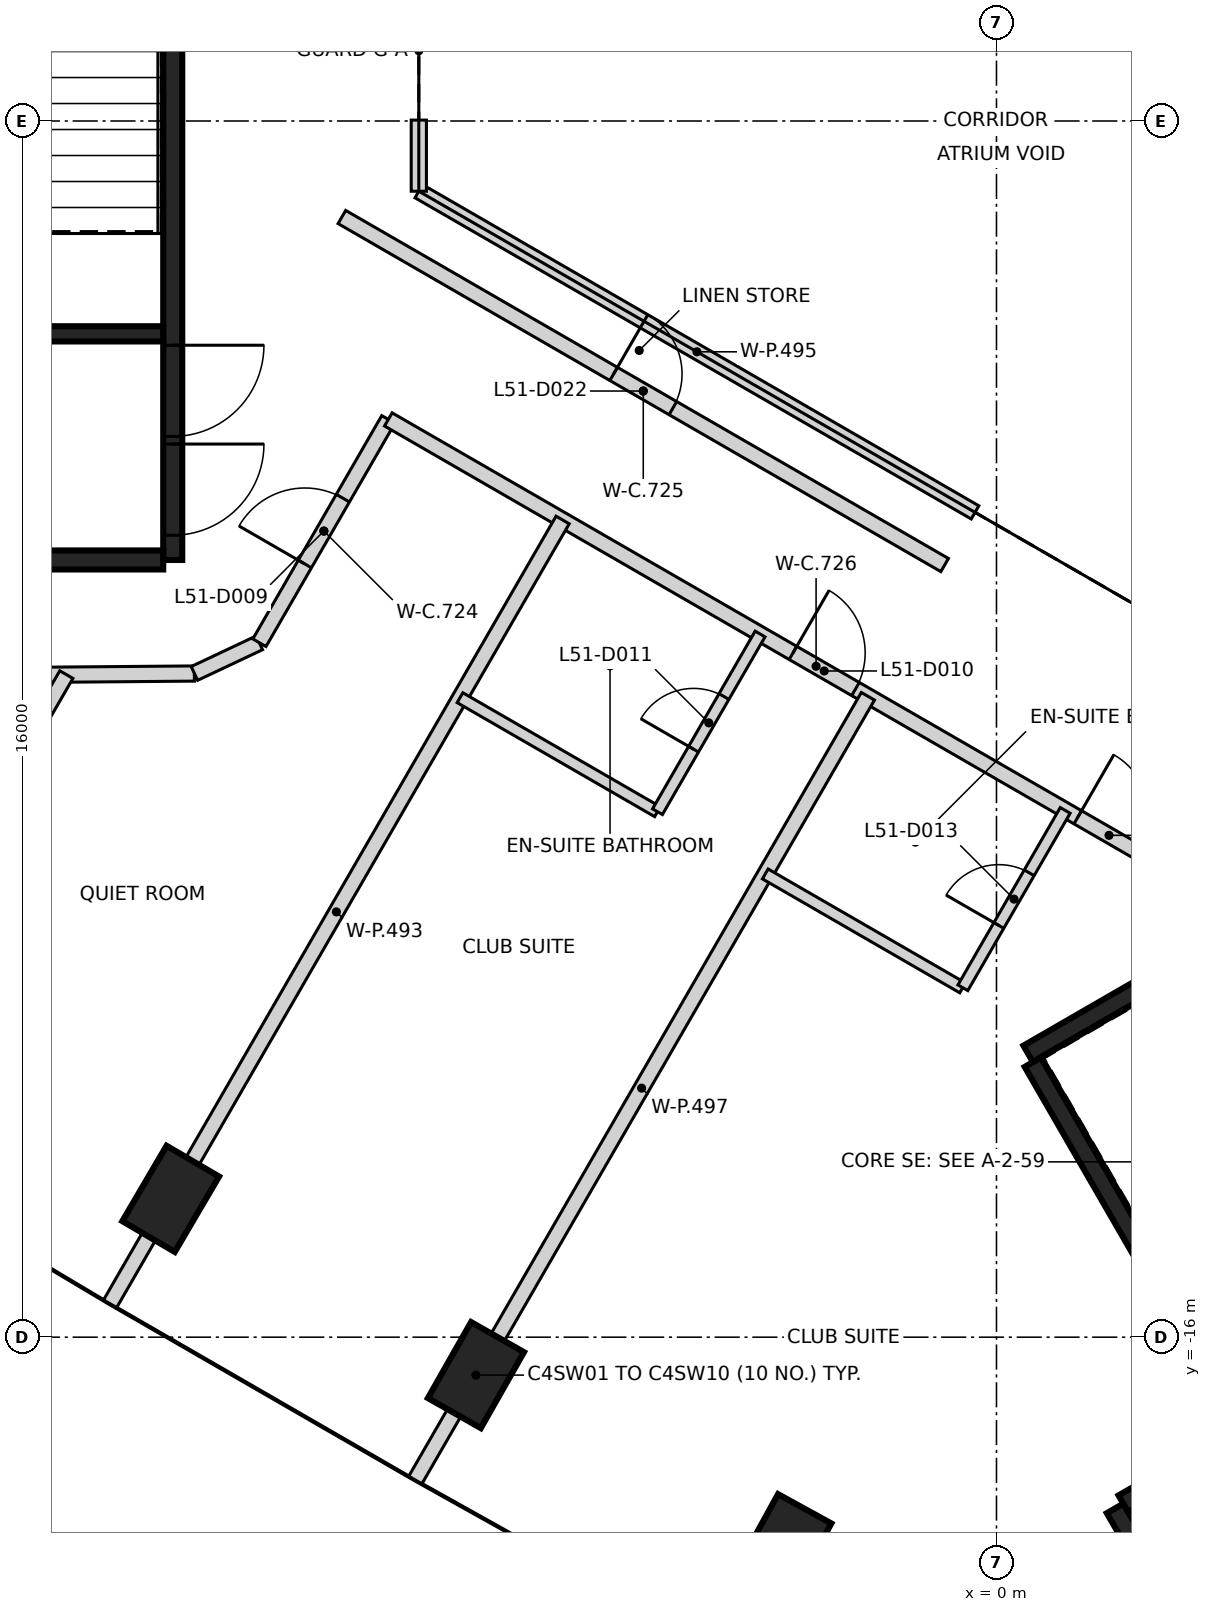
"""IFC4 building model, lengths in metres.
Left out: names, types, materials, properties, quantities, classifications, styles, units other than length and angle.
Written with IfcOpenShell. Run it as: python <this file> out.ifc"""

import sys

from ifc_helpers import new_model, si_unit, direction, frame, frame_2d, origin, origin_2d, place, context, subcontext, project, spatial, rectangle, extrude, element, fill, save


model = new_model("IFC4")
c1 = context("Model", 3, precision=1e-05, world=origin(), true_north=direction((0.0, 1.0)))
c2 = subcontext(c1, "Body", "Model", "MODEL_VIEW")
j1 = project(units=[si_unit("LENGTHUNIT", "METRE"), si_unit("PLANEANGLEUNIT", "RADIAN")], contexts=[c1])
p1 = place(None, origin())
s1 = spatial("IfcSite", under=j1, at=p1, CompositionType="ELEMENT")
p2 = place(p1, origin())
s2 = spatial("IfcBuilding", under=s1, at=p2, CompositionType="ELEMENT")
p3 = place(p2, frame((0.0, 0.0, 204.4)))
s3 = spatial("IfcBuildingStorey", under=s2, at=p3, CompositionType="ELEMENT", Elevation=204.4)
for number, where, z_axis, x_axis in (
    (1, (-10.864, -14.18, -0.35), (0.0, 0.0, 1.0), (0.506, 0.862, 0.0)),
    (2, (-6.848, -16.499, -0.35), (0.0, 0.0, 1.0), (0.494, 0.87, 0.0)),
    (3, (-2.8, -18.762, -0.35), (0.0, 0.0, 1.0), (0.482, 0.876, 0.0)),
):
    element("IfcColumn", number, at=place(p3, frame(where, z_axis=z_axis, x_axis=x_axis)), inside=s3, PredefinedType="COLUMN", context=c2, shape_type="SweptSolid", body=[
        extrude(rectangle(XDim=1.15, YDim=0.8, at=origin_2d()), origin(), (0.0, 0.0, 1.0), 3.6),
    ])
p4 = place(p3, frame((-10.837, 5.775, 0.0), z_axis=(0.0, 0.0, 1.0), x_axis=(0.0, -1.0, 0.0)))
e4 = element("IfcWall", 4, at=p4, inside=s3, PredefinedType="SHEAR", context=c2, shape_type="SweptSolid", body=[
    extrude(rectangle(XDim=11.55, YDim=0.25, at=frame_2d((5.775, 0.0))), origin(), (0.0, 0.0, 1.0), 3.25),
])
p5 = place(p4, frame((10.025, 0.0, 0.0)))
e5 = element("IfcOpeningElement", 5, at=p5, cuts=e4, PredefinedType="OPENING", context=c2, shape_type="SweptSolid", body=[
    extrude(rectangle(XDim=1.2, YDim=2.1, at=frame_2d((0.6, 1.05))), frame((0.0, 0.135, 0.0), z_axis=(0.0, -1.0, 0.0), x_axis=(1.0, 0.0, 0.0)), (0.0, 0.0, 1.0), 0.27),
])
p6 = place(p4, frame((8.725, 0.0, 0.0)))
e6 = element("IfcOpeningElement", 6, at=p6, cuts=e4, PredefinedType="OPENING", context=c2, shape_type="SweptSolid", body=[
    extrude(rectangle(XDim=1.2, YDim=2.1, at=frame_2d((0.6, 1.05))), frame((0.0, 0.135, 0.0), z_axis=(0.0, -1.0, 0.0), x_axis=(1.0, 0.0, 0.0)), (0.0, 0.0, 1.0), 0.27),
])
p7 = place(p3, frame((-10.963, -5.775, 0.0), z_axis=(0.0, 0.0, 1.0), x_axis=(-1.0, 0.0, 0.0)))
e7 = element("IfcWall", 7, at=p7, inside=s3, PredefinedType="SHEAR", context=c2, shape_type="SweptSolid", body=[
    extrude(rectangle(XDim=5.225, YDim=0.25, at=frame_2d((2.612, 0.0))), origin(), (0.0, 0.0, 1.0), 3.25),
])
p8 = place(p3, frame((-10.963, -2.8, 0.0), z_axis=(0.0, 0.0, 1.0), x_axis=(-1.0, 0.0, 0.0)))
e8 = element("IfcWall", 8, at=p8, inside=s3, PredefinedType="SHEAR", context=c2, shape_type="SweptSolid", body=[
    extrude(rectangle(XDim=5.098, YDim=0.2, at=frame_2d((2.549, 0.0))), origin(), (0.0, 0.0, 1.0), 3.25),
])
p9 = place(p8, frame((1.774, 0.0, 0.0)))
e9 = element("IfcOpeningElement", 9, at=p9, cuts=e8, PredefinedType="OPENING", context=c2, shape_type="SweptSolid", body=[
    extrude(rectangle(XDim=1.4, YDim=2.1, at=frame_2d((0.7, 1.05))), frame((0.0, 0.11, 0.0), z_axis=(0.0, -1.0, 0.0), x_axis=(1.0, 0.0, 0.0)), (0.0, 0.0, 1.0), 0.22),
])
p10 = place(p3, frame((0.417, -12.273, 0.0), z_axis=(0.0, 0.0, 1.0), x_axis=(0.866021906294, 0.500006057782, 0.0)))
e10 = element("IfcWall", 10, at=p10, inside=s3, PredefinedType="SHEAR", context=c2, shape_type="SweptSolid", body=[
    extrude(rectangle(XDim=11.55, YDim=0.25, at=frame_2d((5.775, 0.0))), origin(), (0.0, 0.0, 1.0), 3.25),
])
p11 = place(p10, frame((10.025, 0.0, 0.0)))
e11 = element("IfcOpeningElement", 11, at=p11, cuts=e10, PredefinedType="OPENING", context=c2, shape_type="SweptSolid", body=[
    extrude(rectangle(XDim=1.2, YDim=2.1, at=frame_2d((0.6, 1.05))), frame((0.0, 0.135, 0.0), z_axis=(0.0, -1.0, 0.0), x_axis=(1.0, 0.0, 0.0)), (0.0, 0.0, 1.0), 0.27),
])
p12 = place(p10, frame((8.725, 0.0, 0.0)))
e12 = element("IfcOpeningElement", 12, at=p12, cuts=e10, PredefinedType="OPENING", context=c2, shape_type="SweptSolid", body=[
    extrude(rectangle(XDim=1.2, YDim=2.1, at=frame_2d((0.6, 1.05))), frame((0.0, 0.135, 0.0), z_axis=(0.0, -1.0, 0.0), x_axis=(1.0, 0.0, 0.0)), (0.0, 0.0, 1.0), 0.27),
])
p13 = place(p3, frame((3.235, -17.153, 0.0), z_axis=(0.0, 0.0, 1.0), x_axis=(-0.500008851346, 0.866020293397, 0.0)))
e13 = element("IfcWall", 13, at=p13, inside=s3, PredefinedType="SHEAR", context=c2, shape_type="SweptSolid", body=[
    extrude(rectangle(XDim=5.51, YDim=0.25, at=frame_2d((2.755, 0.0))), origin(), (0.0, 0.0, 1.0), 3.25),
])
p14 = place(p3, frame((3.085, -20.894, 0.0), z_axis=(0.0, 0.0, 1.0), x_axis=(-0.499978833458, 0.866037623948, 0.0)))
e14 = element("IfcWall", 14, at=p14, inside=s3, PredefinedType="SHEAR", context=c2, shape_type="SweptSolid", body=[
    extrude(rectangle(XDim=3.05, YDim=0.25, at=frame_2d((1.525, 0.0))), origin(), (0.0, 0.0, 1.0), 3.25),
])
p15 = place(p3, frame((1.669, -18.19, 0.0), z_axis=(0.0, 0.0, 1.0), x_axis=(0.866042235819, 0.499970844928, 0.0)))
e15 = element("IfcWall", 15, at=p15, inside=s3, PredefinedType="SHEAR", context=c2, shape_type="SweptSolid", body=[
    extrude(rectangle(XDim=2.865, YDim=0.25, at=frame_2d((1.432, 0.0))), origin(), (0.0, 0.0, 1.0), 3.25),
])
p16 = place(p3, frame((-20.944, -7.356, 0.0), z_axis=(0.0, 0.0, 1.0), x_axis=(0.999965021341, 0.008363976025, 0.0)))
e16 = element("IfcWall", 16, at=p16, inside=s3, PredefinedType="PARTITIONING", context=c2, shape_type="SweptSolid", body=[
    extrude(rectangle(XDim=10.391, YDim=0.2, at=frame_2d((5.196, 0.0))), origin(), (0.0, 0.0, 1.0), 3.25),
])
p17 = place(p16, frame((3.86, 0.0, 0.0)))
e17 = element("IfcOpeningElement", 17, at=p17, cuts=e16, PredefinedType="OPENING", context=c2, shape_type="SweptSolid", body=[
    extrude(rectangle(XDim=1.0, YDim=2.1, at=frame_2d((0.5, 1.05))), frame((0.0, 0.11, 0.0), z_axis=(0.0, -1.0, 0.0), x_axis=(1.0, 0.0, 0.0)), (0.0, 0.0, 1.0), 0.22),
])
p18 = place(p3, frame((-10.552, -7.268, 0.0), z_axis=(0.0, 0.0, 1.0), x_axis=(0.904331815333, 0.426830139255, 0.0)))
e18 = element("IfcWall", 18, at=p18, inside=s3, PredefinedType="PARTITIONING", context=c2, shape_type="SweptSolid", body=[
    extrude(rectangle(XDim=0.944, YDim=0.2, at=frame_2d((0.472, 0.0))), origin(), (0.0, 0.0, 1.0), 3.25),
])
p19 = place(p3, frame((-9.697, -6.864, 0.0), z_axis=(0.0, 0.0, 1.0), x_axis=(0.499955030392, 0.866051365443, 0.0)))
e19 = element("IfcWall", 19, at=p19, inside=s3, PredefinedType="PARTITIONING", context=c2, shape_type="SweptSolid", body=[
    extrude(rectangle(XDim=3.392, YDim=0.2, at=frame_2d((1.696, 0.0))), origin(), (0.0, 0.0, 1.0), 3.25),
])
p20 = place(p19, frame((1.196, 0.0, 0.0)))
e20 = element("IfcOpeningElement", 20, at=p20, cuts=e19, PredefinedType="OPENING", context=c2, shape_type="SweptSolid", body=[
    extrude(rectangle(XDim=1.0, YDim=2.1, at=frame_2d((0.5, 1.05))), frame((0.0, 0.11, 0.0), z_axis=(0.0, -1.0, 0.0), x_axis=(1.0, 0.0, 0.0)), (0.0, 0.0, 1.0), 0.22),
])
p21 = place(p3, frame((-8.612, -1.263, 0.0), z_axis=(0.0, 0.0, 1.0), x_axis=(0.865996442381, -0.500050159267, 0.0)))
e21 = element("IfcWall", 21, at=p21, inside=s3, PredefinedType="PARTITIONING", context=c2, shape_type="SweptSolid", body=[
    extrude(rectangle(XDim=9.157, YDim=0.2, at=frame_2d((4.579, 0.0))), origin(), (0.0, 0.0, 1.0), 3.25),
])
p22 = place(p21, frame((4.128, 0.0, 0.0)))
e22 = element("IfcOpeningElement", 22, at=p22, cuts=e21, PredefinedType="OPENING", context=c2, shape_type="SweptSolid", body=[
    extrude(rectangle(XDim=0.9, YDim=2.1, at=frame_2d((0.45, 1.05))), frame((0.0, 0.11, 0.0), z_axis=(0.0, -1.0, 0.0), x_axis=(1.0, 0.0, 0.0)), (0.0, 0.0, 1.0), 0.22),
])
p23 = place(p3, frame((-8.001, -3.926, 0.0), z_axis=(0.0, 0.0, 1.0), x_axis=(0.866131158271, -0.499816783104, 0.0)))
e23 = element("IfcWall", 23, at=p23, inside=s3, PredefinedType="PARTITIONING", context=c2, shape_type="SweptSolid", body=[
    extrude(rectangle(XDim=12.995, YDim=0.2, at=frame_2d((6.498, 0.0))), origin(), (0.0, 0.0, 1.0), 3.25),
])
p24 = place(p23, frame((6.146, 0.0, 0.0)))
e24 = element("IfcOpeningElement", 24, at=p24, cuts=e23, PredefinedType="OPENING", context=c2, shape_type="SweptSolid", body=[
    extrude(rectangle(XDim=0.95, YDim=2.1, at=frame_2d((0.475, 1.05))), frame((0.0, 0.11, 0.0), z_axis=(0.0, -1.0, 0.0), x_axis=(1.0, 0.0, 0.0)), (0.0, 0.0, 1.0), 0.22),
])
p25 = place(p23, frame((10.472, 0.0, 0.0)))
e25 = element("IfcOpeningElement", 25, at=p25, cuts=e23, PredefinedType="OPENING", context=c2, shape_type="SweptSolid", body=[
    extrude(rectangle(XDim=0.95, YDim=2.1, at=frame_2d((0.475, 1.05))), frame((0.0, 0.11, 0.0), z_axis=(0.0, -1.0, 0.0), x_axis=(1.0, 0.0, 0.0)), (0.0, 0.0, 1.0), 0.22),
])
p26 = place(p3, frame((-15.645, -13.187, 0.0), z_axis=(0.0, 0.0, 1.0), x_axis=(0.499921913572, 0.866070482311, 0.0)))
e26 = element("IfcWall", 26, at=p26, inside=s3, PredefinedType="PARTITIONING", context=c2, shape_type="SweptSolid", body=[
    extrude(rectangle(XDim=6.816, YDim=0.2, at=frame_2d((3.408, 0.0))), origin(), (0.0, 0.0, 1.0), 3.25),
])
p27 = place(p3, frame((-11.661, -15.561, 0.0), z_axis=(0.0, 0.0, 1.0), x_axis=(0.500000523332, 0.866025101638, 0.0)))
e27 = element("IfcWall", 27, at=p27, inside=s3, PredefinedType="PARTITIONING", context=c2, shape_type="SweptSolid", body=[
    extrude(rectangle(XDim=11.907, YDim=0.2, at=frame_2d((5.953, 0.0))), origin(), (0.0, 0.0, 1.0), 3.25),
])
p28 = place(p3, frame((-7.6, -0.924, 0.0), z_axis=(0.0, 0.0, 1.0), x_axis=(0.866038843867, -0.499976720371, 0.0)))
e28 = element("IfcWall", 28, at=p28, inside=s3, PredefinedType="PARTITIONING", context=c2, shape_type="SweptSolid", body=[
    extrude(rectangle(XDim=8.45, YDim=0.2, at=frame_2d((4.225, 0.0))), origin(), (0.0, 0.0, 1.0), 3.25),
])
p29 = place(p3, frame((-7.6, -0.924, 0.0), z_axis=(0.0, 0.0, 1.0), x_axis=(0.0, 1.0, 0.0)))
e29 = element("IfcWall", 29, at=p29, inside=s3, PredefinedType="PARTITIONING", context=c2, shape_type="SweptSolid", body=[
    extrude(rectangle(XDim=0.936, YDim=0.2, at=frame_2d((0.468, 0.0))), origin(), (0.0, 0.0, 1.0), 3.25),
])
p30 = place(p3, frame((-7.646, -17.879, 0.0), z_axis=(0.0, 0.0, 1.0), x_axis=(0.500042538917, 0.866000842536, 0.0)))
e30 = element("IfcWall", 30, at=p30, inside=s3, PredefinedType="PARTITIONING", context=c2, shape_type="SweptSolid", body=[
    extrude(rectangle(XDim=11.906, YDim=0.2, at=frame_2d((5.953, 0.0))), origin(), (0.0, 0.0, 1.0), 3.25),
])
p31 = place(p3, frame((-7.058, -7.587, 0.0), z_axis=(0.0, 0.0, 1.0), x_axis=(0.866031096941, -0.499990139034, 0.0)))
e31 = element("IfcWall", 31, at=p31, inside=s3, PredefinedType="PARTITIONING", context=c2, shape_type="SweptSolid", body=[
    extrude(rectangle(XDim=3.0, YDim=0.15, at=frame_2d((1.5, 0.0))), origin(), (0.0, 0.0, 1.0), 3.25),
])
p32 = place(p3, frame((-4.46, -9.087, 0.0), z_axis=(0.0, 0.0, 1.0), x_axis=(0.50001992892, 0.866013897511, 0.0)))
e32 = element("IfcWall", 32, at=p32, inside=s3, PredefinedType="PARTITIONING", context=c2, shape_type="SweptSolid", body=[
    extrude(rectangle(XDim=2.7, YDim=0.15, at=frame_2d((1.35, 0.0))), origin(), (0.0, 0.0, 1.0), 3.25),
])
p33 = place(p32, frame((0.95, 0.0, 0.0)))
e33 = element("IfcOpeningElement", 33, at=p33, cuts=e32, PredefinedType="OPENING", context=c2, shape_type="SweptSolid", body=[
    extrude(rectangle(XDim=0.8, YDim=2.1, at=frame_2d((0.4, 1.05))), frame((0.0, 0.085, 0.0), z_axis=(0.0, -1.0, 0.0), x_axis=(1.0, 0.0, 0.0)), (0.0, 0.0, 1.0), 0.17),
])
p34 = place(p3, frame((-3.042, -9.906, 0.0), z_axis=(0.0, 0.0, 1.0), x_axis=(0.866009279501, -0.500027927039, 0.0)))
e34 = element("IfcWall", 34, at=p34, inside=s3, PredefinedType="PARTITIONING", context=c2, shape_type="SweptSolid", body=[
    extrude(rectangle(XDim=2.998, YDim=0.15, at=frame_2d((1.499, 0.0))), origin(), (0.0, 0.0, 1.0), 3.25),
])
p35 = place(p3, frame((-0.442, -11.403, 0.0), z_axis=(0.0, 0.0, 1.0), x_axis=(0.499717222117, 0.866188604127, 0.0)))
e35 = element("IfcWall", 35, at=p35, inside=s3, PredefinedType="PARTITIONING", context=c2, shape_type="SweptSolid", body=[
    extrude(rectangle(XDim=2.693, YDim=0.15, at=frame_2d((1.347, 0.0))), origin(), (0.0, 0.0, 1.0), 3.25),
])
p36 = place(p35, frame((0.946, 0.0, 0.0)))
e36 = element("IfcOpeningElement", 36, at=p36, cuts=e35, PredefinedType="OPENING", context=c2, shape_type="SweptSolid", body=[
    extrude(rectangle(XDim=0.8, YDim=2.1, at=frame_2d((0.4, 1.05))), frame((0.0, 0.085, 0.0), z_axis=(0.0, -1.0, 0.0), x_axis=(1.0, 0.0, 0.0)), (0.0, 0.0, 1.0), 0.17),
])
p37 = place(p5, origin())
e37 = element("IfcDoor", 37, at=p37, inside=s3, OperationType="SINGLE_SWING_LEFT", PredefinedType="DOOR", context=c2, shape_type="SweptSolid", body=[
    extrude(rectangle(XDim=1.2, YDim=2.1, at=frame_2d((0.6, 1.05))), frame((0.0, 0.025, 0.0), z_axis=(0.0, -1.0, 0.0), x_axis=(1.0, 0.0, 0.0)), (0.0, 0.0, 1.0), 0.05),
])
fill(e5, e37)
p38 = place(p6, origin())
e38 = element("IfcDoor", 38, at=p38, inside=s3, OperationType="SINGLE_SWING_RIGHT", PredefinedType="DOOR", context=c2, shape_type="SweptSolid", body=[
    extrude(rectangle(XDim=1.2, YDim=2.1, at=frame_2d((0.6, 1.05))), frame((0.0, 0.025, 0.0), z_axis=(0.0, -1.0, 0.0), x_axis=(1.0, 0.0, 0.0)), (0.0, 0.0, 1.0), 0.05),
])
fill(e6, e38)
p39 = place(p20, frame((1.0, 0.0, 0.0), z_axis=(0.0, 0.0, 1.0), x_axis=(-1.0, 0.0, 0.0)))
e39 = element("IfcDoor", 39, at=p39, inside=s3, OperationType="SINGLE_SWING_LEFT", PredefinedType="DOOR", context=c2, shape_type="SweptSolid", body=[
    extrude(rectangle(XDim=1.0, YDim=2.1, at=frame_2d((0.5, 1.05))), frame((0.0, 0.025, 0.0), z_axis=(0.0, -1.0, 0.0), x_axis=(1.0, 0.0, 0.0)), (0.0, 0.0, 1.0), 0.05),
])
fill(e20, e39)
p40 = place(p24, frame((0.95, 0.0, 0.0), z_axis=(0.0, 0.0, 1.0), x_axis=(-1.0, 0.0, 0.0)))
e40 = element("IfcDoor", 40, at=p40, inside=s3, OperationType="SINGLE_SWING_LEFT", PredefinedType="DOOR", context=c2, shape_type="SweptSolid", body=[
    extrude(rectangle(XDim=0.95, YDim=2.1, at=frame_2d((0.475, 1.05))), frame((0.0, 0.025, 0.0), z_axis=(0.0, -1.0, 0.0), x_axis=(1.0, 0.0, 0.0)), (0.0, 0.0, 1.0), 0.05),
])
fill(e24, e40)
p41 = place(p33, origin())
e41 = element("IfcDoor", 41, at=p41, inside=s3, OperationType="SINGLE_SWING_LEFT", PredefinedType="DOOR", context=c2, shape_type="SweptSolid", body=[
    extrude(rectangle(XDim=0.8, YDim=2.1, at=frame_2d((0.4, 1.05))), frame((0.0, 0.025, 0.0), z_axis=(0.0, -1.0, 0.0), x_axis=(1.0, 0.0, 0.0)), (0.0, 0.0, 1.0), 0.05),
])
fill(e33, e41)
p42 = place(p25, frame((0.95, 0.0, 0.0), z_axis=(0.0, 0.0, 1.0), x_axis=(-1.0, 0.0, 0.0)))
e42 = element("IfcDoor", 42, at=p42, inside=s3, OperationType="SINGLE_SWING_LEFT", PredefinedType="DOOR", context=c2, shape_type="SweptSolid", body=[
    extrude(rectangle(XDim=0.95, YDim=2.1, at=frame_2d((0.475, 1.05))), frame((0.0, 0.025, 0.0), z_axis=(0.0, -1.0, 0.0), x_axis=(1.0, 0.0, 0.0)), (0.0, 0.0, 1.0), 0.05),
])
fill(e25, e42)
p43 = place(p36, frame((0.8, 0.0, 0.0), z_axis=(0.0, 0.0, 1.0), x_axis=(-1.0, 0.0, 0.0)))
e43 = element("IfcDoor", 43, at=p43, inside=s3, OperationType="SINGLE_SWING_LEFT", PredefinedType="DOOR", context=c2, shape_type="SweptSolid", body=[
    extrude(rectangle(XDim=0.8, YDim=2.1, at=frame_2d((0.4, 1.05))), frame((0.0, 0.025, 0.0), z_axis=(0.0, -1.0, 0.0), x_axis=(1.0, 0.0, 0.0)), (0.0, 0.0, 1.0), 0.05),
])
fill(e36, e43)
p44 = place(p22, origin())
e44 = element("IfcDoor", 44, at=p44, inside=s3, OperationType="SINGLE_SWING_LEFT", PredefinedType="DOOR", context=c2, shape_type="SweptSolid", body=[
    extrude(rectangle(XDim=0.9, YDim=2.1, at=frame_2d((0.45, 1.05))), frame((0.0, 0.025, 0.0), z_axis=(0.0, -1.0, 0.0), x_axis=(1.0, 0.0, 0.0)), (0.0, 0.0, 1.0), 0.05),
])
fill(e22, e44)
save(model, sys.argv[1])
